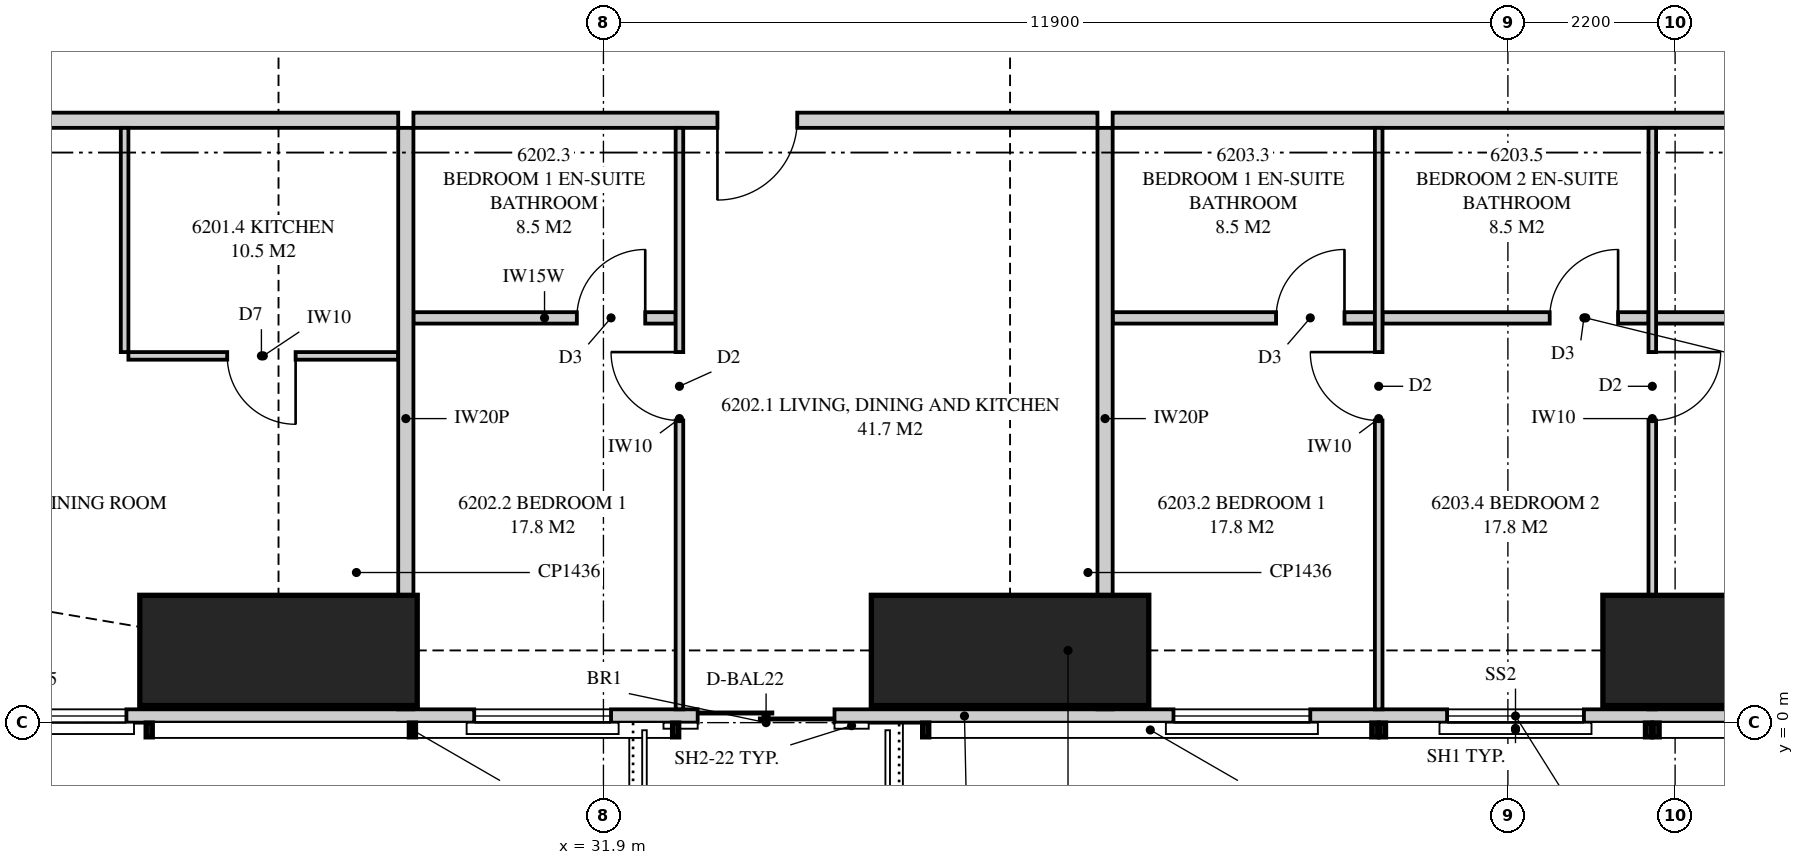
"""IFC4 building model, lengths in metres.
Left out: names, types, materials, properties, quantities, classifications, styles, units other than length and angle.
Written with IfcOpenShell. Run it as: python <this file> out.ifc"""

import sys

from ifc_helpers import new_model, si_unit, direction, frame, frame_2d, origin, origin_2d, place, context, subcontext, project, spatial, polyline, rectangle, outline, extrude, element, fill, save


model = new_model("IFC4")
c1 = context("Model", 3, precision=1e-05, world=origin(), true_north=direction((0.0, 1.0)))
c2 = subcontext(c1, "Body", "Model", "MODEL_VIEW")
j1 = project(units=[si_unit("LENGTHUNIT", "METRE"), si_unit("PLANEANGLEUNIT", "RADIAN")], contexts=[c1])
p1 = place(None, origin())
s1 = spatial("IfcSite", under=j1, at=p1, CompositionType="ELEMENT")
p2 = place(p1, origin())
s2 = spatial("IfcBuilding", under=s1, at=p2, CompositionType="ELEMENT")
p3 = place(p2, frame((0.0, 0.0, 228.45)))
s3 = spatial("IfcBuildingStorey", under=s2, at=p3, CompositionType="ELEMENT", Elevation=228.45)
for number, where, z_axis, x_axis in (
    (1, (27.625, 0.95, 0.0), (0.0, 0.0, 1.0), (0.0, 1.0, 0.0)),
    (2, (37.25, 0.95, 0.0), (0.0, 0.0, 1.0), (0.0, 1.0, 0.0)),
    (3, (46.875, 0.95, 0.0), (0.0, 0.0, 1.0), (0.0, 1.0, 0.0)),
):
    element("IfcColumn", number, at=place(p3, frame(where, z_axis=z_axis, x_axis=x_axis)), inside=s3, PredefinedType="COLUMN", context=c2, shape_type="SweptSolid", body=[
        extrude(rectangle(XDim=1.45, YDim=3.65, at=origin_2d()), origin(), (0.0, 0.0, 1.0), 3.5),
    ])
p4 = place(p3, frame((19.851, 0.087, 0.0), z_axis=(0.0, 0.0, 1.0), x_axis=(1.0, 0.0, 0.0)))
e4 = element("IfcWall", 4, at=p4, inside=s3, PredefinedType="SOLIDWALL", context=c2, shape_type="SweptSolid", body=[
    extrude(outline(polyline([(0.0, 0.0), (33.597, 0.0), (33.597, 3.26), (27.239, 3.26), (27.239, 2.3), (27.155, 2.3), (27.155, 3.26), (27.024, 3.26), (27.024, 2.3), (7.774, 2.3), (7.774, 3.26), (7.642, 3.26), (7.642, 2.3), (7.559, 2.3), (7.559, 3.26), (0.0, 3.26), (0.0, 0.0)])), frame((0.0, 0.087, 0.0), z_axis=(0.0, -1.0, 0.0), x_axis=(1.0, 0.0, 0.0)), (0.0, 0.0, 1.0), 0.175),
])
p5 = place(p4, frame((3.373, 0.0, 0.4)))
e5 = element("IfcOpeningElement", 5, at=p5, cuts=e4, PredefinedType="OPENING", context=c2, shape_type="SweptSolid", body=[
    extrude(rectangle(XDim=2.4, YDim=1.85, at=frame_2d((1.2, 0.925))), frame((0.0, 0.097, 0.0), z_axis=(0.0, -1.0, 0.0), x_axis=(1.0, 0.0, 0.0)), (0.0, 0.0, 1.0), 0.195),
])
p6 = place(p4, frame((10.349, 0.0, 0.4)))
e6 = element("IfcOpeningElement", 6, at=p6, cuts=e4, PredefinedType="OPENING", context=c2, shape_type="SweptSolid", body=[
    extrude(rectangle(XDim=1.8, YDim=1.85, at=frame_2d((0.9, 0.925))), frame((0.0, 0.097, 0.0), z_axis=(0.0, -1.0, 0.0), x_axis=(1.0, 0.0, 0.0)), (0.0, 0.0, 1.0), 0.195),
])
p7 = place(p4, frame((13.289, 0.0, 0.0)))
e7 = element("IfcOpeningElement", 7, at=p7, cuts=e4, PredefinedType="OPENING", context=c2, shape_type="SweptSolid", body=[
    extrude(rectangle(XDim=1.8, YDim=2.25, at=frame_2d((0.9, 1.125))), frame((0.0, 0.097, 0.0), z_axis=(0.0, -1.0, 0.0), x_axis=(1.0, 0.0, 0.0)), (0.0, 0.0, 1.0), 0.195),
])
p8 = place(p4, frame((19.549, 0.0, 0.4)))
e8 = element("IfcOpeningElement", 8, at=p8, cuts=e4, PredefinedType="OPENING", context=c2, shape_type="SweptSolid", body=[
    extrude(rectangle(XDim=1.8, YDim=1.85, at=frame_2d((0.9, 0.925))), frame((0.0, 0.097, 0.0), z_axis=(0.0, -1.0, 0.0), x_axis=(1.0, 0.0, 0.0)), (0.0, 0.0, 1.0), 0.195),
])
p9 = place(p4, frame((23.149, 0.0, 0.4)))
e9 = element("IfcOpeningElement", 9, at=p9, cuts=e4, PredefinedType="OPENING", context=c2, shape_type="SweptSolid", body=[
    extrude(rectangle(XDim=1.8, YDim=1.85, at=frame_2d((0.9, 0.925))), frame((0.0, 0.097, 0.0), z_axis=(0.0, -1.0, 0.0), x_axis=(1.0, 0.0, 0.0)), (0.0, 0.0, 1.0), 0.195),
])
p10 = place(p4, frame((28.979, 0.0, 0.4)))
e10 = element("IfcOpeningElement", 10, at=p10, cuts=e4, PredefinedType="OPENING", context=c2, shape_type="SweptSolid", body=[
    extrude(rectangle(XDim=1.8, YDim=1.85, at=frame_2d((0.9, 0.925))), frame((0.0, 0.097, 0.0), z_axis=(0.0, -1.0, 0.0), x_axis=(1.0, 0.0, 0.0)), (0.0, 0.0, 1.0), 0.195),
])
p11 = place(p4, frame((31.861, 0.0, 0.4)))
e11 = element("IfcOpeningElement", 11, at=p11, cuts=e4, PredefinedType="OPENING", context=c2, shape_type="SweptSolid", body=[
    extrude(rectangle(XDim=1.2, YDim=1.85, at=frame_2d((0.6, 0.925))), frame((0.0, 0.097, 0.0), z_axis=(0.0, -1.0, 0.0), x_axis=(1.0, 0.0, 0.0)), (0.0, 0.0, 1.0), 0.195),
])
p12 = place(p3, frame((29.3, 0.175, 0.0), z_axis=(0.0, 0.0, 1.0), x_axis=(0.0, 1.0, 0.0)))
e12 = element("IfcWall", 12, at=p12, inside=s3, PredefinedType="PARTITIONING", context=c2, shape_type="SweptSolid", body=[
    extrude(outline(polyline([(0.0, 0.0), (7.65, 0.0), (7.65, 3.26), (1.685, 3.26), (1.685, 2.3), (0.0, 2.3), (0.0, 3.26), (0.0, 0.0)])), frame((0.0, 0.1, 0.0), z_axis=(0.0, -1.0, 0.0), x_axis=(1.0, 0.0, 0.0)), (0.0, 0.0, 1.0), 0.2),
])
p13 = place(p3, frame((18.0, 7.925, 0.0), z_axis=(0.0, 0.0, 1.0), x_axis=(1.0, 0.0, 0.0)))
e13 = element("IfcWall", 13, at=p13, inside=s3, PredefinedType="PARTITIONING", context=c2, shape_type="SweptSolid", body=[
    extrude(outline(polyline([(0.0, 0.0), (11.2, 0.0), (11.2, 3.26), (10.935, 3.26), (10.935, 2.66), (8.315, 2.66), (8.315, 3.26), (1.839, 3.26), (1.839, 2.3), (0.0, 2.3), (0.0, 3.26), (0.0, 0.0)])), frame((0.0, 0.1, 0.0), z_axis=(0.0, -1.0, 0.0), x_axis=(1.0, 0.0, 0.0)), (0.0, 0.0, 1.0), 0.2),
])
p14 = place(p13, frame((5.15, 0.0, 0.0)))
e14 = element("IfcOpeningElement", 14, at=p14, cuts=e13, PredefinedType="OPENING", context=c2, shape_type="SweptSolid", body=[
    extrude(rectangle(XDim=1.05, YDim=2.2, at=frame_2d((0.525, 1.1))), frame((0.0, 0.11, 0.0), z_axis=(0.0, -1.0, 0.0), x_axis=(1.0, 0.0, 0.0)), (0.0, 0.0, 1.0), 0.22),
])
p15 = place(p3, frame((25.65, 4.825, 0.0), z_axis=(0.0, 0.0, 1.0), x_axis=(1.0, 0.0, 0.0)))
e15 = element("IfcWall", 15, at=p15, inside=s3, PredefinedType="PARTITIONING", context=c2, shape_type="SweptSolid", body=[
    extrude(outline(polyline([(0.0, 0.0), (3.55, 0.0), (3.55, 3.26), (3.235, 3.26), (3.235, 2.66), (0.715, 2.66), (0.715, 3.26), (0.0, 3.26), (0.0, 0.0)])), frame((0.0, 0.05, 0.0), z_axis=(0.0, -1.0, 0.0), x_axis=(1.0, 0.0, 0.0)), (0.0, 0.0, 1.0), 0.1),
])
p16 = place(p15, frame((1.3, 0.0, 0.0)))
e16 = element("IfcOpeningElement", 16, at=p16, cuts=e15, PredefinedType="OPENING", context=c2, shape_type="SweptSolid", body=[
    extrude(rectangle(XDim=0.9, YDim=2.1, at=frame_2d((0.45, 1.05))), frame((0.0, 0.06, 0.0), z_axis=(0.0, -1.0, 0.0), x_axis=(1.0, 0.0, 0.0)), (0.0, 0.0, 1.0), 0.12),
])
p17 = place(p3, frame((25.6, 4.875, 0.0), z_axis=(0.0, 0.0, 1.0), x_axis=(0.0, 1.0, 0.0)))
e17 = element("IfcWall", 17, at=p17, inside=s3, PredefinedType="PARTITIONING", context=c2, shape_type="SweptSolid", body=[
    extrude(rectangle(XDim=2.95, YDim=0.1, at=frame_2d((1.475, 0.0))), origin(), (0.0, 0.0, 1.0), 3.26),
])
p18 = place(p3, frame((38.5, 0.175, 0.0), z_axis=(0.0, 0.0, 1.0), x_axis=(0.0, 1.0, 0.0)))
e18 = element("IfcWall", 18, at=p18, inside=s3, PredefinedType="PARTITIONING", context=c2, shape_type="SweptSolid", body=[
    extrude(outline(polyline([(0.529, 2.3), (0.0, 2.3), (0.0, 0.0), (0.529, 0.0), (0.529, 0.281), (1.021, 0.281), (1.021, 0.0), (7.65, 0.0), (7.65, 2.66), (1.685, 2.66), (1.685, 2.3), (1.021, 2.3), (1.021, 2.019), (0.529, 2.019), (0.529, 2.3)])), frame((0.0, 0.1, 0.0), z_axis=(0.0, -1.0, 0.0), x_axis=(1.0, 0.0, 0.0)), (0.0, 0.0, 1.0), 0.2),
])
p19 = place(p3, frame((29.4, 7.925, 0.0), z_axis=(0.0, 0.0, 1.0), x_axis=(1.0, 0.0, 0.0)))
e19 = element("IfcWall", 19, at=p19, inside=s3, PredefinedType="PARTITIONING", context=c2, shape_type="SweptSolid", body=[
    extrude(outline(polyline([(0.0, 0.0), (9.0, 0.0), (9.0, 3.26), (9.0, 2.66), (6.54, 2.66), (6.54, 3.26), (0.0, 3.26), (0.0, 0.0)])), frame((0.0, 0.1, 0.0), z_axis=(0.0, -1.0, 0.0), x_axis=(1.0, 0.0, 0.0)), (0.0, 0.0, 1.0), 0.2),
])
p20 = place(p19, frame((4.0, 0.0, 0.0)))
e20 = element("IfcOpeningElement", 20, at=p20, cuts=e19, PredefinedType="OPENING", context=c2, shape_type="SweptSolid", body=[
    extrude(rectangle(XDim=1.05, YDim=2.2, at=frame_2d((0.525, 1.1))), frame((0.0, 0.11, 0.0), z_axis=(0.0, -1.0, 0.0), x_axis=(1.0, 0.0, 0.0)), (0.0, 0.0, 1.0), 0.22),
])
p21 = place(p3, frame((32.9, 0.175, 0.0), z_axis=(0.0, 0.0, 1.0), x_axis=(0.0, 1.0, 0.0)))
e21 = element("IfcWall", 21, at=p21, inside=s3, PredefinedType="PARTITIONING", context=c2, shape_type="SweptSolid", body=[
    extrude(outline(polyline([(0.0, 0.0), (7.65, 0.0), (7.65, 3.26), (1.635, 3.26), (1.635, 2.3), (0.0, 2.3), (0.0, 3.26), (0.0, 0.0)])), frame((0.0, 0.05, 0.0), z_axis=(0.0, -1.0, 0.0), x_axis=(1.0, 0.0, 0.0)), (0.0, 0.0, 1.0), 0.1),
])
p22 = place(p21, frame((3.8, 0.0, 0.0)))
e22 = element("IfcOpeningElement", 22, at=p22, cuts=e21, PredefinedType="OPENING", context=c2, shape_type="SweptSolid", body=[
    extrude(rectangle(XDim=0.9, YDim=2.1, at=frame_2d((0.45, 1.05))), frame((0.0, 0.06, 0.0), z_axis=(0.0, -1.0, 0.0), x_axis=(1.0, 0.0, 0.0)), (0.0, 0.0, 1.0), 0.12),
])
p23 = place(p3, frame((29.4, 5.325, 0.0), z_axis=(0.0, 0.0, 1.0), x_axis=(1.0, 0.0, 0.0)))
e23 = element("IfcWall", 23, at=p23, inside=s3, PredefinedType="PLUMBINGWALL", context=c2, shape_type="SweptSolid", body=[
    extrude(rectangle(XDim=3.45, YDim=0.15, at=frame_2d((1.725, 0.0))), origin(), (0.0, 0.0, 1.0), 3.26),
])
p24 = place(p23, frame((2.15, 0.0, 0.0)))
e24 = element("IfcOpeningElement", 24, at=p24, cuts=e23, PredefinedType="OPENING", context=c2, shape_type="SweptSolid", body=[
    extrude(rectangle(XDim=0.9, YDim=2.1, at=frame_2d((0.45, 1.05))), frame((0.0, 0.085, 0.0), z_axis=(0.0, -1.0, 0.0), x_axis=(1.0, 0.0, 0.0)), (0.0, 0.0, 1.0), 0.17),
])
p25 = place(p3, frame((38.6, 7.925, 0.0), z_axis=(0.0, 0.0, 1.0), x_axis=(1.0, 0.0, 0.0)))
e25 = element("IfcWall", 25, at=p25, inside=s3, PredefinedType="PARTITIONING", context=c2, shape_type="SweptSolid", body=[
    extrude(outline(polyline([(0.0, 0.0), (17.725, 0.0), (17.725, 3.26), (17.275, 3.26), (17.275, 2.3), (15.443, 2.3), (15.443, 3.26), (9.585, 3.26), (9.585, 2.66), (6.965, 2.66), (6.965, 3.26), (0.0, 3.26), (0.0, 0.0)])), frame((0.0, 0.1, 0.0), z_axis=(0.0, -1.0, 0.0), x_axis=(1.0, 0.0, 0.0)), (0.0, 0.0, 1.0), 0.2),
])
p26 = place(p25, frame((12.9, 0.0, 0.0)))
e26 = element("IfcOpeningElement", 26, at=p26, cuts=e25, PredefinedType="OPENING", context=c2, shape_type="SweptSolid", body=[
    extrude(rectangle(XDim=1.05, YDim=2.2, at=frame_2d((0.525, 1.1))), frame((0.0, 0.11, 0.0), z_axis=(0.0, -1.0, 0.0), x_axis=(1.0, 0.0, 0.0)), (0.0, 0.0, 1.0), 0.22),
])
p27 = place(p3, frame((42.1, 0.175, 0.0), z_axis=(0.0, 0.0, 1.0), x_axis=(0.0, 1.0, 0.0)))
e27 = element("IfcWall", 27, at=p27, inside=s3, PredefinedType="PARTITIONING", context=c2, shape_type="SweptSolid", body=[
    extrude(outline(polyline([(0.0, 0.0), (7.65, 0.0), (7.65, 3.26), (1.635, 3.26), (1.635, 2.3), (0.0, 2.3), (0.0, 3.26), (0.0, 0.0)])), frame((0.0, 0.05, 0.0), z_axis=(0.0, -1.0, 0.0), x_axis=(1.0, 0.0, 0.0)), (0.0, 0.0, 1.0), 0.1),
])
p28 = place(p27, frame((3.8, 0.0, 0.0)))
e28 = element("IfcOpeningElement", 28, at=p28, cuts=e27, PredefinedType="OPENING", context=c2, shape_type="SweptSolid", body=[
    extrude(rectangle(XDim=0.9, YDim=2.1, at=frame_2d((0.45, 1.05))), frame((0.0, 0.06, 0.0), z_axis=(0.0, -1.0, 0.0), x_axis=(1.0, 0.0, 0.0)), (0.0, 0.0, 1.0), 0.12),
])
p29 = place(p3, frame((45.7, 0.175, 0.0), z_axis=(0.0, 0.0, 1.0), x_axis=(0.0, 1.0, 0.0)))
e29 = element("IfcWall", 29, at=p29, inside=s3, PredefinedType="PARTITIONING", context=c2, shape_type="SweptSolid", body=[
    extrude(outline(polyline([(0.529, 2.3), (0.0, 2.3), (0.0, 0.0), (0.529, 0.0), (0.529, 0.31), (1.021, 0.31), (1.021, 0.0), (7.65, 0.0), (7.65, 2.66), (1.635, 2.66), (1.635, 2.3), (1.021, 2.3), (1.021, 1.99), (0.529, 1.99), (0.529, 2.3)])), frame((0.0, 0.05, 0.0), z_axis=(0.0, -1.0, 0.0), x_axis=(1.0, 0.0, 0.0)), (0.0, 0.0, 1.0), 0.1),
])
p30 = place(p29, frame((3.8, 0.0, 0.0)))
e30 = element("IfcOpeningElement", 30, at=p30, cuts=e29, PredefinedType="OPENING", context=c2, shape_type="SweptSolid", body=[
    extrude(rectangle(XDim=0.9, YDim=2.1, at=frame_2d((0.45, 1.05))), frame((0.0, 0.06, 0.0), z_axis=(0.0, -1.0, 0.0), x_axis=(1.0, 0.0, 0.0)), (0.0, 0.0, 1.0), 0.12),
])
p31 = place(p3, frame((38.6, 5.325, 0.0), z_axis=(0.0, 0.0, 1.0), x_axis=(1.0, 0.0, 0.0)))
e31 = element("IfcWall", 31, at=p31, inside=s3, PredefinedType="PLUMBINGWALL", context=c2, shape_type="SweptSolid", body=[
    extrude(rectangle(XDim=3.45, YDim=0.15, at=frame_2d((1.725, 0.0))), origin(), (0.0, 0.0, 1.0), 3.26),
])
p32 = place(p31, frame((2.15, 0.0, 0.0)))
e32 = element("IfcOpeningElement", 32, at=p32, cuts=e31, PredefinedType="OPENING", context=c2, shape_type="SweptSolid", body=[
    extrude(rectangle(XDim=0.9, YDim=2.1, at=frame_2d((0.45, 1.05))), frame((0.0, 0.085, 0.0), z_axis=(0.0, -1.0, 0.0), x_axis=(1.0, 0.0, 0.0)), (0.0, 0.0, 1.0), 0.17),
])
p33 = place(p3, frame((42.15, 5.325, 0.0), z_axis=(0.0, 0.0, 1.0), x_axis=(1.0, 0.0, 0.0)))
e33 = element("IfcWall", 33, at=p33, inside=s3, PredefinedType="PLUMBINGWALL", context=c2, shape_type="SweptSolid", body=[
    extrude(outline(polyline([(0.0, 0.0), (3.5, 0.0), (3.5, 3.26), (3.5, 2.66), (3.44, 2.66), (3.44, 3.26), (0.0, 3.26), (0.0, 0.0)])), frame((0.0, 0.075, 0.0), z_axis=(0.0, -1.0, 0.0), x_axis=(1.0, 0.0, 0.0)), (0.0, 0.0, 1.0), 0.15),
])
p34 = place(p33, frame((2.2, 0.0, 0.0)))
e34 = element("IfcOpeningElement", 34, at=p34, cuts=e33, PredefinedType="OPENING", context=c2, shape_type="SweptSolid", body=[
    extrude(rectangle(XDim=0.9, YDim=2.1, at=frame_2d((0.45, 1.05))), frame((0.0, 0.085, 0.0), z_axis=(0.0, -1.0, 0.0), x_axis=(1.0, 0.0, 0.0)), (0.0, 0.0, 1.0), 0.17),
])
p35 = place(p3, frame((45.75, 5.325, 0.0), z_axis=(0.0, 0.0, 1.0), x_axis=(1.0, 0.0, 0.0)))
e35 = element("IfcWall", 35, at=p35, inside=s3, PredefinedType="PLUMBINGWALL", context=c2, shape_type="SweptSolid", body=[
    extrude(outline(polyline([(0.0, 0.0), (5.3, 0.0), (5.3, 3.26), (2.41, 3.26), (2.41, 2.66), (0.0, 2.66), (0.0, 3.26), (0.0, 0.0)])), frame((0.0, 0.075, 0.0), z_axis=(0.0, -1.0, 0.0), x_axis=(1.0, 0.0, 0.0)), (0.0, 0.0, 1.0), 0.15),
])
p36 = place(p5, origin())
e36 = element("IfcWindow", 36, at=p36, inside=s3, PartitioningType="SINGLE_PANEL", PredefinedType="WINDOW", context=c2, shape_type="SweptSolid", body=[
    extrude(rectangle(XDim=2.4, YDim=1.85, at=frame_2d((1.2, 0.925))), frame((0.0, 0.03, 0.0), z_axis=(0.0, -1.0, 0.0), x_axis=(1.0, 0.0, 0.0)), (0.0, 0.0, 1.0), 0.06),
])
fill(e5, e36)
p37 = place(p6, origin())
e37 = element("IfcWindow", 37, at=p37, inside=s3, PartitioningType="SINGLE_PANEL", PredefinedType="WINDOW", context=c2, shape_type="SweptSolid", body=[
    extrude(rectangle(XDim=1.8, YDim=1.85, at=frame_2d((0.9, 0.925))), frame((0.0, 0.03, 0.0), z_axis=(0.0, -1.0, 0.0), x_axis=(1.0, 0.0, 0.0)), (0.0, 0.0, 1.0), 0.06),
])
fill(e6, e37)
p38 = place(p7, origin())
e38 = element("IfcDoor", 38, at=p38, inside=s3, OperationType="SLIDING_TO_LEFT", PredefinedType="DOOR", context=c2, shape_type="SweptSolid", body=[
    extrude(rectangle(XDim=1.8, YDim=2.25, at=frame_2d((0.9, 1.125))), frame((0.0, 0.025, 0.0), z_axis=(0.0, -1.0, 0.0), x_axis=(1.0, 0.0, 0.0)), (0.0, 0.0, 1.0), 0.05),
])
fill(e7, e38)
p39 = place(p8, origin())
e39 = element("IfcWindow", 39, at=p39, inside=s3, PartitioningType="SINGLE_PANEL", PredefinedType="WINDOW", context=c2, shape_type="SweptSolid", body=[
    extrude(rectangle(XDim=1.8, YDim=1.85, at=frame_2d((0.9, 0.925))), frame((0.0, 0.03, 0.0), z_axis=(0.0, -1.0, 0.0), x_axis=(1.0, 0.0, 0.0)), (0.0, 0.0, 1.0), 0.06),
])
fill(e8, e39)
p40 = place(p9, origin())
e40 = element("IfcWindow", 40, at=p40, inside=s3, PartitioningType="SINGLE_PANEL", PredefinedType="WINDOW", context=c2, shape_type="SweptSolid", body=[
    extrude(rectangle(XDim=1.8, YDim=1.85, at=frame_2d((0.9, 0.925))), frame((0.0, 0.03, 0.0), z_axis=(0.0, -1.0, 0.0), x_axis=(1.0, 0.0, 0.0)), (0.0, 0.0, 1.0), 0.06),
])
fill(e9, e40)
p41 = place(p16, frame((0.9, 0.0, 0.0), z_axis=(0.0, 0.0, 1.0), x_axis=(-1.0, 0.0, 0.0)))
e41 = element("IfcDoor", 41, at=p41, inside=s3, OperationType="SINGLE_SWING_LEFT", PredefinedType="DOOR", context=c2, shape_type="SweptSolid", body=[
    extrude(rectangle(XDim=0.9, YDim=2.1, at=frame_2d((0.45, 1.05))), frame((0.0, 0.025, 0.0), z_axis=(0.0, -1.0, 0.0), x_axis=(1.0, 0.0, 0.0)), (0.0, 0.0, 1.0), 0.05),
])
fill(e16, e41)
p42 = place(p20, frame((1.05, 0.0, 0.0), z_axis=(0.0, 0.0, 1.0), x_axis=(-1.0, 0.0, 0.0)))
e42 = element("IfcDoor", 42, at=p42, inside=s3, OperationType="SINGLE_SWING_RIGHT", PredefinedType="DOOR", context=c2, shape_type="SweptSolid", body=[
    extrude(rectangle(XDim=1.05, YDim=2.2, at=frame_2d((0.525, 1.1))), frame((0.0, 0.025, 0.0), z_axis=(0.0, -1.0, 0.0), x_axis=(1.0, 0.0, 0.0)), (0.0, 0.0, 1.0), 0.05),
])
fill(e20, e42)
p43 = place(p22, origin())
e43 = element("IfcDoor", 43, at=p43, inside=s3, OperationType="SINGLE_SWING_RIGHT", PredefinedType="DOOR", context=c2, shape_type="SweptSolid", body=[
    extrude(rectangle(XDim=0.9, YDim=2.1, at=frame_2d((0.45, 1.05))), frame((0.0, 0.025, 0.0), z_axis=(0.0, -1.0, 0.0), x_axis=(1.0, 0.0, 0.0)), (0.0, 0.0, 1.0), 0.05),
])
fill(e22, e43)
p44 = place(p24, origin())
e44 = element("IfcDoor", 44, at=p44, inside=s3, OperationType="SINGLE_SWING_RIGHT", PredefinedType="DOOR", context=c2, shape_type="SweptSolid", body=[
    extrude(rectangle(XDim=0.9, YDim=2.1, at=frame_2d((0.45, 1.05))), frame((0.0, 0.025, 0.0), z_axis=(0.0, -1.0, 0.0), x_axis=(1.0, 0.0, 0.0)), (0.0, 0.0, 1.0), 0.05),
])
fill(e24, e44)
p45 = place(p28, origin())
e45 = element("IfcDoor", 45, at=p45, inside=s3, OperationType="SINGLE_SWING_RIGHT", PredefinedType="DOOR", context=c2, shape_type="SweptSolid", body=[
    extrude(rectangle(XDim=0.9, YDim=2.1, at=frame_2d((0.45, 1.05))), frame((0.0, 0.025, 0.0), z_axis=(0.0, -1.0, 0.0), x_axis=(1.0, 0.0, 0.0)), (0.0, 0.0, 1.0), 0.05),
])
fill(e28, e45)
p46 = place(p32, origin())
e46 = element("IfcDoor", 46, at=p46, inside=s3, OperationType="SINGLE_SWING_RIGHT", PredefinedType="DOOR", context=c2, shape_type="SweptSolid", body=[
    extrude(rectangle(XDim=0.9, YDim=2.1, at=frame_2d((0.45, 1.05))), frame((0.0, 0.025, 0.0), z_axis=(0.0, -1.0, 0.0), x_axis=(1.0, 0.0, 0.0)), (0.0, 0.0, 1.0), 0.05),
])
fill(e32, e46)
p47 = place(p30, frame((0.9, 0.0, 0.0), z_axis=(0.0, 0.0, 1.0), x_axis=(-1.0, 0.0, 0.0)))
e47 = element("IfcDoor", 47, at=p47, inside=s3, OperationType="SINGLE_SWING_LEFT", PredefinedType="DOOR", context=c2, shape_type="SweptSolid", body=[
    extrude(rectangle(XDim=0.9, YDim=2.1, at=frame_2d((0.45, 1.05))), frame((0.0, 0.025, 0.0), z_axis=(0.0, -1.0, 0.0), x_axis=(1.0, 0.0, 0.0)), (0.0, 0.0, 1.0), 0.05),
])
fill(e30, e47)
p48 = place(p34, origin())
e48 = element("IfcDoor", 48, at=p48, inside=s3, OperationType="SINGLE_SWING_RIGHT", PredefinedType="DOOR", context=c2, shape_type="SweptSolid", body=[
    extrude(rectangle(XDim=0.9, YDim=2.1, at=frame_2d((0.45, 1.05))), frame((0.0, 0.025, 0.0), z_axis=(0.0, -1.0, 0.0), x_axis=(1.0, 0.0, 0.0)), (0.0, 0.0, 1.0), 0.05),
])
fill(e34, e48)
save(model, sys.argv[1])
